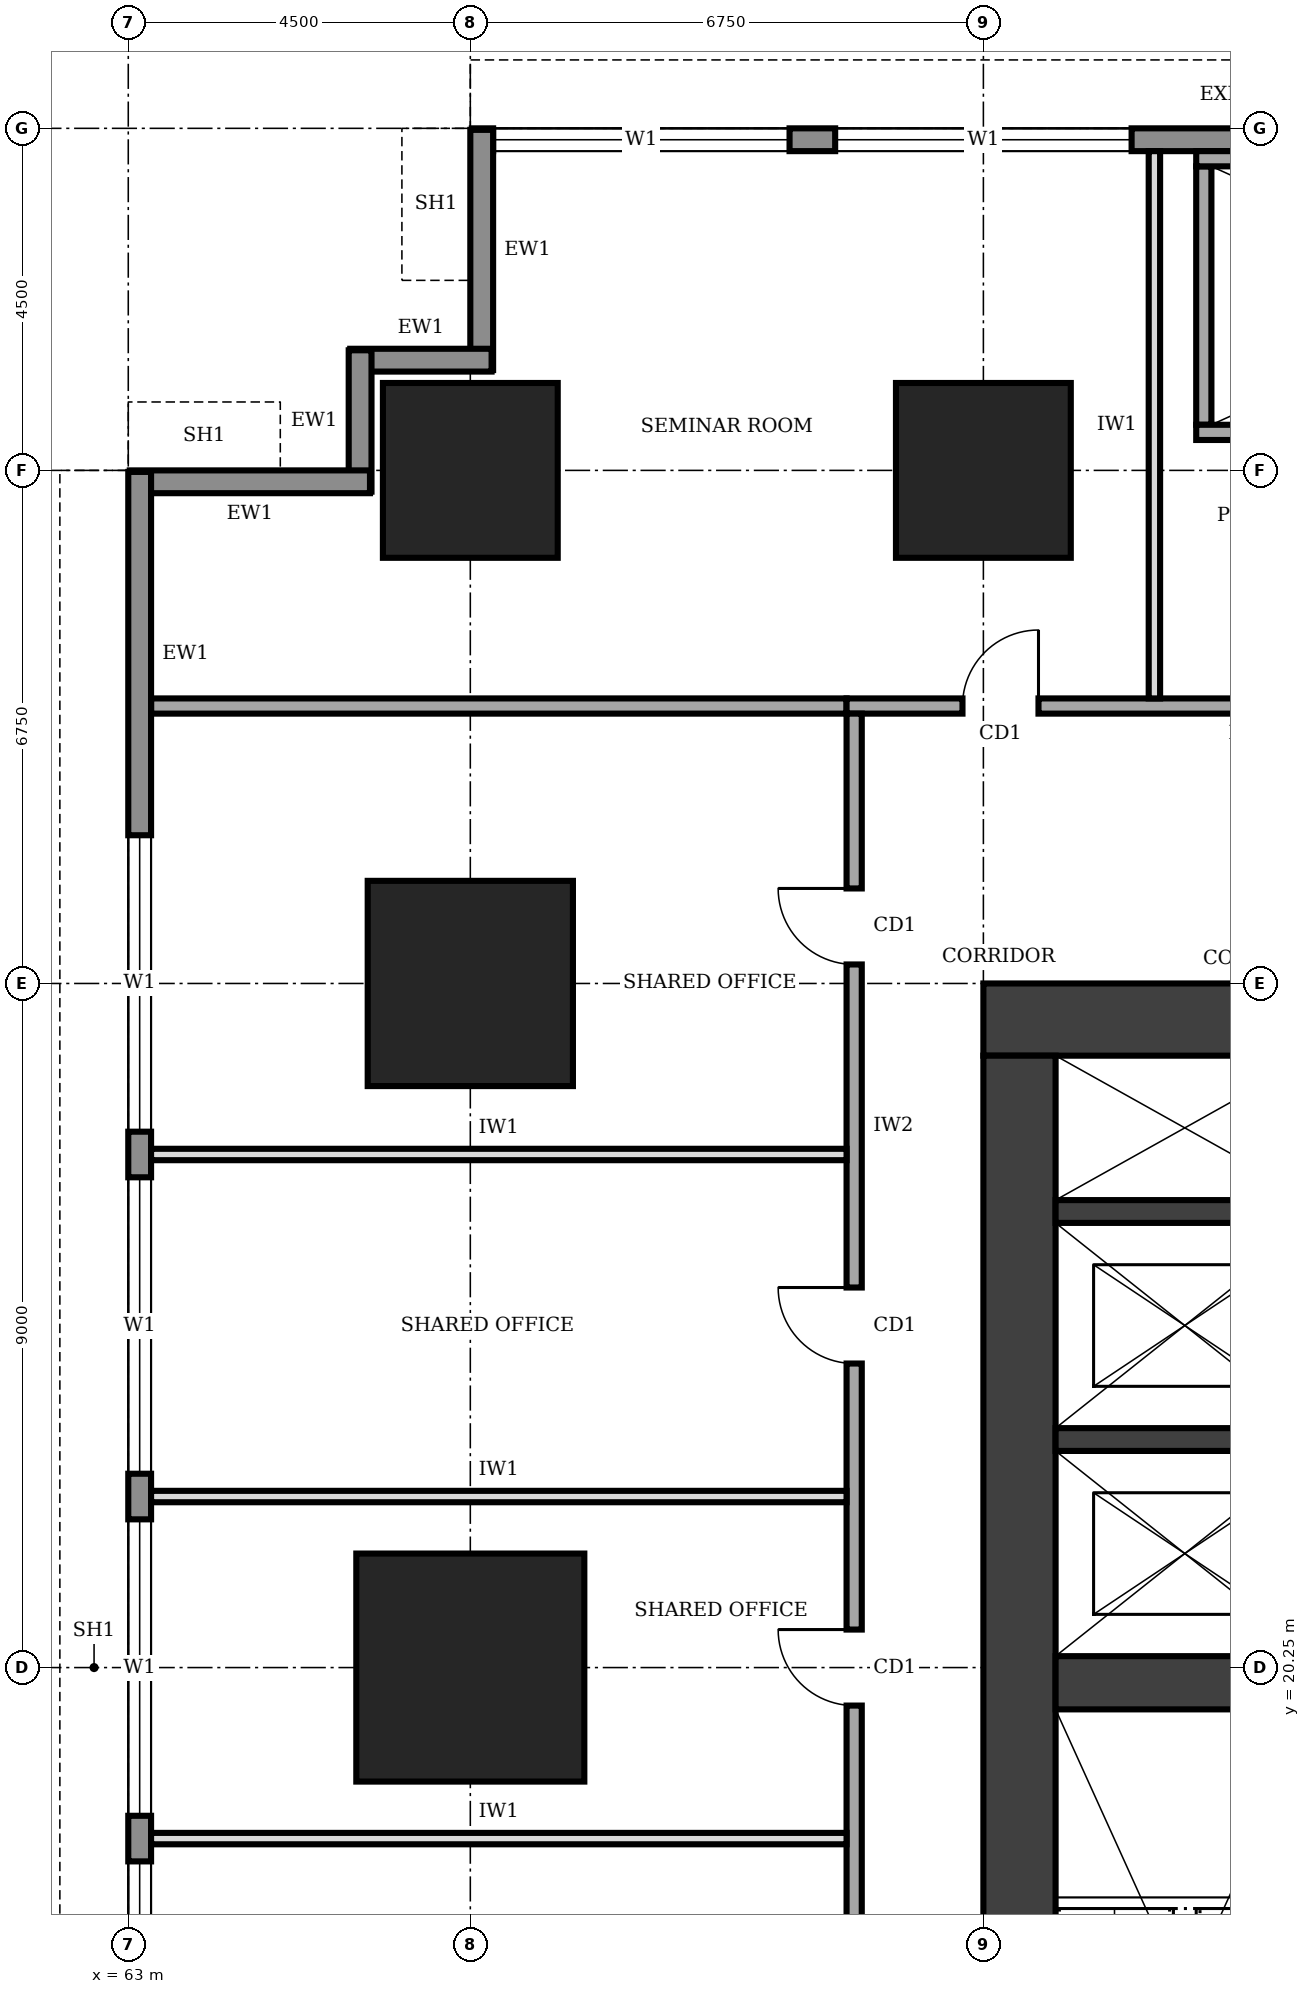
"""IFC4 building model, lengths in metres.
Left out: names, types, materials, properties, quantities, classifications, styles, units other than length and angle.
Written with IfcOpenShell. Run it as: python <this file> out.ifc"""

import sys

from ifc_helpers import new_model, si_unit, direction, frame, frame_2d, origin, origin_2d, place, context, subcontext, project, spatial, rectangle, extrude, element, fill, save


model = new_model("IFC4")
c1 = context("Model", 3, precision=1e-05, world=origin(), true_north=direction((0.0, 1.0)))
c2 = subcontext(c1, "Body", "Model", "MODEL_VIEW")
j1 = project(units=[si_unit("LENGTHUNIT", "METRE"), si_unit("PLANEANGLEUNIT", "RADIAN")], contexts=[c1])
p1 = place(None, origin())
s1 = spatial("IfcSite", under=j1, at=p1, CompositionType="ELEMENT")
p2 = place(p1, origin())
s2 = spatial("IfcBuilding", under=s1, at=p2, CompositionType="ELEMENT")
p3 = place(p2, frame((0.0, 0.0, 29.0)))
s3 = spatial("IfcBuildingStorey", under=s2, at=p3, CompositionType="ELEMENT", Elevation=29.0)
p4 = place(p3, frame((87.75, 28.775, 0.0), z_axis=(0.0, 0.0, 1.0), x_axis=(-1.0, 0.0, 0.0)))
e1 = element("IfcWall", 1, at=p4, inside=s3, PredefinedType="SHEAR", context=c2, shape_type="SweptSolid", body=[
    extrude(rectangle(XDim=13.5, YDim=0.95, at=frame_2d((6.75, 0.0))), origin(), (0.0, 0.0, 1.0), 4.0),
])
p5 = place(p4, frame((4.75, 0.0, 0.0)))
e2 = element("IfcOpeningElement", 2, at=p5, cuts=e1, PredefinedType="OPENING", context=c2, shape_type="SweptSolid", body=[
    extrude(rectangle(XDim=1.8, YDim=2.1, at=frame_2d((0.9, 1.05))), frame((0.0, 0.485, 0.0), z_axis=(0.0, -1.0, 0.0), x_axis=(1.0, 0.0, 0.0)), (0.0, 0.0, 1.0), 0.97),
])
p6 = place(p3, frame((74.725, 28.3, 0.0), z_axis=(0.0, 0.0, 1.0), x_axis=(0.0, -1.0, 0.0)))
e3 = element("IfcWall", 3, at=p6, inside=s3, PredefinedType="SHEAR", context=c2, shape_type="SweptSolid", body=[
    extrude(rectangle(XDim=16.1, YDim=0.95, at=frame_2d((8.05, 0.0))), origin(), (0.0, 0.0, 1.0), 4.0),
])
p7 = place(p3, frame((75.2, 20.05, 0.0), z_axis=(0.0, 0.0, 1.0), x_axis=(1.0, 0.0, 0.0)))
e4 = element("IfcWall", 4, at=p7, inside=s3, PredefinedType="SHEAR", context=c2, shape_type="SweptSolid", body=[
    extrude(rectangle(XDim=3.4, YDim=0.7, at=frame_2d((1.7, 0.0))), origin(), (0.0, 0.0, 1.0), 4.0),
])
for number, where, z_axis, x_axis in (
    (5, (75.2, 23.25, 0.0), (0.0, 0.0, 1.0), (1.0, 0.0, 0.0)),
    (6, (75.2, 26.25, 0.0), (0.0, 0.0, 1.0), (1.0, 0.0, 0.0)),
):
    element("IfcWall", number, at=place(p3, frame(where, z_axis=z_axis, x_axis=x_axis)), inside=s3, PredefinedType="SHEAR", context=c2, shape_type="SweptSolid", body=[
        extrude(rectangle(XDim=3.4, YDim=0.3, at=frame_2d((1.7, 0.0))), origin(), (0.0, 0.0, 1.0), 4.0),
    ])
p8 = place(p3, frame((67.5, 20.25, 0.0), z_axis=(0.0, 0.0, 1.0), x_axis=(1.0, 0.0, 0.0)))
e7 = element("IfcColumn", 7, at=p8, inside=s3, PredefinedType="COLUMN", context=c2, shape_type="SweptSolid", body=[
    extrude(rectangle(XDim=3.0, YDim=3.0, at=origin_2d()), origin(), (0.0, 0.0, 1.0), 4.0),
])
p9 = place(p3, frame((67.5, 29.25, 0.0), z_axis=(0.0, 0.0, 1.0), x_axis=(1.0, 0.0, 0.0)))
e8 = element("IfcColumn", 8, at=p9, inside=s3, PredefinedType="COLUMN", context=c2, shape_type="SweptSolid", body=[
    extrude(rectangle(XDim=2.7, YDim=2.7, at=origin_2d()), origin(), (0.0, 0.0, 1.0), 4.0),
])
for number, where, z_axis, x_axis in (
    (9, (67.5, 36.0, 0.0), (0.0, 0.0, 1.0), (1.0, 0.0, 0.0)),
    (10, (74.25, 36.0, 0.0), (0.0, 0.0, 1.0), (1.0, 0.0, 0.0)),
):
    element("IfcColumn", number, at=place(p3, frame(where, z_axis=z_axis, x_axis=x_axis)), inside=s3, PredefinedType="COLUMN", context=c2, shape_type="SweptSolid", body=[
        extrude(rectangle(XDim=2.3, YDim=2.3, at=origin_2d()), origin(), (0.0, 0.0, 1.0), 4.0),
    ])
p10 = place(p3, frame((94.48, 40.35, 0.0), z_axis=(0.0, 0.0, 1.0), x_axis=(-1.0, 0.0, 0.0)))
e11 = element("IfcWall", 11, at=p10, inside=s3, PredefinedType="STANDARD", context=c2, shape_type="SweptSolid", body=[
    extrude(rectangle(XDim=26.96, YDim=0.3, at=frame_2d((13.48, 0.0))), origin(), (0.0, 0.0, 1.0), 3.75),
])
p11 = place(p10, frame((22.78, 0.0, 0.9)))
e12 = element("IfcOpeningElement", 12, at=p11, cuts=e11, PredefinedType="OPENING", context=c2, shape_type="SweptSolid", body=[
    extrude(rectangle(XDim=3.9, YDim=2.2, at=frame_2d((1.95, 1.1))), frame((0.0, 0.16, 0.0), z_axis=(0.0, -1.0, 0.0), x_axis=(1.0, 0.0, 0.0)), (0.0, 0.0, 1.0), 0.32),
])
p12 = place(p10, frame((18.28, 0.0, 0.9)))
e13 = element("IfcOpeningElement", 13, at=p12, cuts=e11, PredefinedType="OPENING", context=c2, shape_type="SweptSolid", body=[
    extrude(rectangle(XDim=3.9, YDim=2.2, at=frame_2d((1.95, 1.1))), frame((0.0, 0.16, 0.0), z_axis=(0.0, -1.0, 0.0), x_axis=(1.0, 0.0, 0.0)), (0.0, 0.0, 1.0), 0.32),
])
p13 = place(p10, frame((4.78, 0.0, 0.9)))
e14 = element("IfcOpeningElement", 14, at=p13, cuts=e11, PredefinedType="OPENING", context=c2, shape_type="SweptSolid", body=[
    extrude(rectangle(XDim=3.9, YDim=2.2, at=frame_2d((1.95, 1.1))), frame((0.0, 0.16, 0.0), z_axis=(0.0, -1.0, 0.0), x_axis=(1.0, 0.0, 0.0)), (0.0, 0.0, 1.0), 0.32),
])
p14 = place(p3, frame((67.65, 40.48, 0.0), z_axis=(0.0, 0.0, 1.0), x_axis=(0.0, -1.0, 0.0)))
e15 = element("IfcWall", 15, at=p14, inside=s3, PredefinedType="STANDARD", context=c2, shape_type="SweptSolid", body=[
    extrude(rectangle(XDim=3.16, YDim=0.3, at=frame_2d((1.58, 0.0))), origin(), (0.0, 0.0, 1.0), 2.85),
])
for number, where, z_axis, x_axis in (
    (16, (67.78, 37.45, 0.0), (0.0, 0.0, 1.0), (-1.0, 0.0, 0.0)),
    (17, (66.05, 37.58, 0.0), (0.0, 0.0, 1.0), (0.0, -1.0, 0.0)),
):
    element("IfcWall", number, at=place(p3, frame(where, z_axis=z_axis, x_axis=x_axis)), inside=s3, PredefinedType="STANDARD", context=c2, shape_type="SweptSolid", body=[
        extrude(rectangle(XDim=1.86, YDim=0.3, at=frame_2d((0.93, 0.0))), origin(), (0.0, 0.0, 1.0), 3.75),
    ])
p15 = place(p3, frame((66.18, 35.85, 0.0), z_axis=(0.0, 0.0, 1.0), x_axis=(-1.0, 0.0, 0.0)))
e18 = element("IfcWall", 18, at=p15, inside=s3, PredefinedType="STANDARD", context=c2, shape_type="SweptSolid", body=[
    extrude(rectangle(XDim=3.16, YDim=0.3, at=frame_2d((1.58, 0.0))), origin(), (0.0, 0.0, 1.0), 2.85),
])
p16 = place(p3, frame((63.15, 35.98, 0.0), z_axis=(0.0, 0.0, 1.0), x_axis=(0.0, -1.0, 0.0)))
e19 = element("IfcWall", 19, at=p16, inside=s3, PredefinedType="STANDARD", context=c2, shape_type="SweptSolid", body=[
    extrude(rectangle(XDim=31.46, YDim=0.3, at=frame_2d((15.73, 0.0))), origin(), (0.0, 0.0, 1.0), 3.75),
])
p17 = place(p16, frame((27.28, 0.0, 0.9)))
e20 = element("IfcOpeningElement", 20, at=p17, cuts=e19, PredefinedType="OPENING", context=c2, shape_type="SweptSolid", body=[
    extrude(rectangle(XDim=3.9, YDim=2.2, at=frame_2d((1.95, 1.1))), frame((0.0, 0.16, 0.0), z_axis=(0.0, -1.0, 0.0), x_axis=(1.0, 0.0, 0.0)), (0.0, 0.0, 1.0), 0.32),
])
p18 = place(p16, frame((22.78, 0.0, 0.9)))
e21 = element("IfcOpeningElement", 21, at=p18, cuts=e19, PredefinedType="OPENING", context=c2, shape_type="SweptSolid", body=[
    extrude(rectangle(XDim=3.9, YDim=2.2, at=frame_2d((1.95, 1.1))), frame((0.0, 0.16, 0.0), z_axis=(0.0, -1.0, 0.0), x_axis=(1.0, 0.0, 0.0)), (0.0, 0.0, 1.0), 0.32),
])
p19 = place(p16, frame((18.28, 0.0, 0.9)))
e22 = element("IfcOpeningElement", 22, at=p19, cuts=e19, PredefinedType="OPENING", context=c2, shape_type="SweptSolid", body=[
    extrude(rectangle(XDim=3.9, YDim=2.2, at=frame_2d((1.95, 1.1))), frame((0.0, 0.16, 0.0), z_axis=(0.0, -1.0, 0.0), x_axis=(1.0, 0.0, 0.0)), (0.0, 0.0, 1.0), 0.32),
])
p20 = place(p16, frame((13.78, 0.0, 0.9)))
e23 = element("IfcOpeningElement", 23, at=p20, cuts=e19, PredefinedType="OPENING", context=c2, shape_type="SweptSolid", body=[
    extrude(rectangle(XDim=3.9, YDim=2.2, at=frame_2d((1.95, 1.1))), frame((0.0, 0.16, 0.0), z_axis=(0.0, -1.0, 0.0), x_axis=(1.0, 0.0, 0.0)), (0.0, 0.0, 1.0), 0.32),
])
p21 = place(p16, frame((9.28, 0.0, 0.9)))
e24 = element("IfcOpeningElement", 24, at=p21, cuts=e19, PredefinedType="OPENING", context=c2, shape_type="SweptSolid", body=[
    extrude(rectangle(XDim=3.9, YDim=2.2, at=frame_2d((1.95, 1.1))), frame((0.0, 0.16, 0.0), z_axis=(0.0, -1.0, 0.0), x_axis=(1.0, 0.0, 0.0)), (0.0, 0.0, 1.0), 0.32),
])
p22 = place(p16, frame((4.78, 0.0, 0.9)))
e25 = element("IfcOpeningElement", 25, at=p22, cuts=e19, PredefinedType="OPENING", context=c2, shape_type="SweptSolid", body=[
    extrude(rectangle(XDim=3.9, YDim=2.2, at=frame_2d((1.95, 1.1))), frame((0.0, 0.16, 0.0), z_axis=(0.0, -1.0, 0.0), x_axis=(1.0, 0.0, 0.0)), (0.0, 0.0, 1.0), 0.32),
])
p23 = place(p3, frame((89.35, 32.9, 0.0), z_axis=(0.0, 0.0, 1.0), x_axis=(-1.0, 0.0, 0.0)))
e26 = element("IfcWall", 26, at=p23, inside=s3, PredefinedType="SOLIDWALL", context=c2, shape_type="SweptSolid", body=[
    extrude(rectangle(XDim=16.9, YDim=0.2, at=frame_2d((8.45, 0.0))), origin(), (0.0, 0.0, 1.0), 3.75),
])
p24 = place(p23, frame((14.375, 0.0, 0.0)))
e27 = element("IfcOpeningElement", 27, at=p24, cuts=e26, PredefinedType="OPENING", context=c2, shape_type="SweptSolid", body=[
    extrude(rectangle(XDim=1.0, YDim=2.1, at=frame_2d((0.5, 1.05))), frame((0.0, 0.11, 0.0), z_axis=(0.0, -1.0, 0.0), x_axis=(1.0, 0.0, 0.0)), (0.0, 0.0, 1.0), 0.22),
])
p25 = place(p23, frame((7.85, 0.0, 0.0)))
e28 = element("IfcOpeningElement", 28, at=p25, cuts=e26, PredefinedType="OPENING", context=c2, shape_type="SweptSolid", body=[
    extrude(rectangle(XDim=1.0, YDim=2.1, at=frame_2d((0.5, 1.05))), frame((0.0, 0.11, 0.0), z_axis=(0.0, -1.0, 0.0), x_axis=(1.0, 0.0, 0.0)), (0.0, 0.0, 1.0), 0.22),
])
p26 = place(p23, frame((1.325, 0.0, 0.0)))
e29 = element("IfcOpeningElement", 29, at=p26, cuts=e26, PredefinedType="OPENING", context=c2, shape_type="SweptSolid", body=[
    extrude(rectangle(XDim=1.0, YDim=2.1, at=frame_2d((0.5, 1.05))), frame((0.0, 0.11, 0.0), z_axis=(0.0, -1.0, 0.0), x_axis=(1.0, 0.0, 0.0)), (0.0, 0.0, 1.0), 0.22),
])
p27 = place(p3, frame((72.55, 32.8, 0.0), z_axis=(0.0, 0.0, 1.0), x_axis=(0.0, -1.0, 0.0)))
e30 = element("IfcWall", 30, at=p27, inside=s3, PredefinedType="SOLIDWALL", context=c2, shape_type="SweptSolid", body=[
    extrude(rectangle(XDim=23.8, YDim=0.2, at=frame_2d((11.9, 0.0))), origin(), (0.0, 0.0, 1.0), 3.75),
])
p28 = place(p27, frame((21.05, 0.0, 0.0)))
e31 = element("IfcOpeningElement", 31, at=p28, cuts=e30, PredefinedType="OPENING", context=c2, shape_type="SweptSolid", body=[
    extrude(rectangle(XDim=1.0, YDim=2.1, at=frame_2d((0.5, 1.05))), frame((0.0, 0.11, 0.0), z_axis=(0.0, -1.0, 0.0), x_axis=(1.0, 0.0, 0.0)), (0.0, 0.0, 1.0), 0.22),
])
p29 = place(p27, frame((16.55, 0.0, 0.0)))
e32 = element("IfcOpeningElement", 32, at=p29, cuts=e30, PredefinedType="OPENING", context=c2, shape_type="SweptSolid", body=[
    extrude(rectangle(XDim=1.0, YDim=2.1, at=frame_2d((0.5, 1.05))), frame((0.0, 0.11, 0.0), z_axis=(0.0, -1.0, 0.0), x_axis=(1.0, 0.0, 0.0)), (0.0, 0.0, 1.0), 0.22),
])
p30 = place(p27, frame((12.05, 0.0, 0.0)))
e33 = element("IfcOpeningElement", 33, at=p30, cuts=e30, PredefinedType="OPENING", context=c2, shape_type="SweptSolid", body=[
    extrude(rectangle(XDim=1.0, YDim=2.1, at=frame_2d((0.5, 1.05))), frame((0.0, 0.11, 0.0), z_axis=(0.0, -1.0, 0.0), x_axis=(1.0, 0.0, 0.0)), (0.0, 0.0, 1.0), 0.22),
])
p31 = place(p27, frame((7.55, 0.0, 0.0)))
e34 = element("IfcOpeningElement", 34, at=p31, cuts=e30, PredefinedType="OPENING", context=c2, shape_type="SweptSolid", body=[
    extrude(rectangle(XDim=1.0, YDim=2.1, at=frame_2d((0.5, 1.05))), frame((0.0, 0.11, 0.0), z_axis=(0.0, -1.0, 0.0), x_axis=(1.0, 0.0, 0.0)), (0.0, 0.0, 1.0), 0.22),
])
p32 = place(p27, frame((2.3, 0.0, 0.0)))
e35 = element("IfcOpeningElement", 35, at=p32, cuts=e30, PredefinedType="OPENING", context=c2, shape_type="SweptSolid", body=[
    extrude(rectangle(XDim=1.0, YDim=2.1, at=frame_2d((0.5, 1.05))), frame((0.0, 0.11, 0.0), z_axis=(0.0, -1.0, 0.0), x_axis=(1.0, 0.0, 0.0)), (0.0, 0.0, 1.0), 0.22),
])
p33 = place(p3, frame((63.3, 32.9, 0.0), z_axis=(0.0, 0.0, 1.0), x_axis=(1.0, 0.0, 0.0)))
e36 = element("IfcWall", 36, at=p33, inside=s3, PredefinedType="SOLIDWALL", context=c2, shape_type="SweptSolid", body=[
    extrude(rectangle(XDim=9.15, YDim=0.2, at=frame_2d((4.575, 0.0))), origin(), (0.0, 0.0, 1.0), 3.75),
])
p34 = place(p3, frame((76.5, 33.0, 0.0), z_axis=(0.0, 0.0, 1.0), x_axis=(0.0, 1.0, 0.0)))
e37 = element("IfcWall", 37, at=p34, inside=s3, PredefinedType="PARTITIONING", context=c2, shape_type="SweptSolid", body=[
    extrude(rectangle(XDim=7.2, YDim=0.15, at=frame_2d((3.6, 0.0))), origin(), (0.0, 0.0, 1.0), 3.75),
])
for number, where, z_axis, x_axis in (
    (38, (63.3, 18.0, 0.0), (0.0, 0.0, 1.0), (1.0, 0.0, 0.0)),
    (39, (63.3, 22.5, 0.0), (0.0, 0.0, 1.0), (1.0, 0.0, 0.0)),
    (40, (63.3, 27.0, 0.0), (0.0, 0.0, 1.0), (1.0, 0.0, 0.0)),
):
    element("IfcWall", number, at=place(p3, frame(where, z_axis=z_axis, x_axis=x_axis)), inside=s3, PredefinedType="PARTITIONING", context=c2, shape_type="SweptSolid", body=[
        extrude(rectangle(XDim=9.15, YDim=0.15, at=frame_2d((4.575, 0.0))), origin(), (0.0, 0.0, 1.0), 3.75),
    ])
p35 = place(p3, frame((77.05, 36.5, 0.0), z_axis=(0.0, 0.0, 1.0), x_axis=(1.0, 0.0, 0.0)))
e41 = element("IfcWall", 41, at=p35, inside=s3, PredefinedType="SOLIDWALL", context=c2, shape_type="SweptSolid", body=[
    extrude(rectangle(XDim=7.9, YDim=0.2, at=frame_2d((3.95, 0.0))), origin(), (0.0, 0.0, 1.0), 3.75),
])
p36 = place(p35, frame((6.3, 0.0, 0.0)))
e42 = element("IfcOpeningElement", 42, at=p36, cuts=e41, PredefinedType="OPENING", context=c2, shape_type="SweptSolid", body=[
    extrude(rectangle(XDim=1.0, YDim=2.1, at=frame_2d((0.5, 1.05))), frame((0.0, 0.11, 0.0), z_axis=(0.0, -1.0, 0.0), x_axis=(1.0, 0.0, 0.0)), (0.0, 0.0, 1.0), 0.22),
])
p37 = place(p3, frame((77.05, 40.1, 0.0), z_axis=(0.0, 0.0, 1.0), x_axis=(1.0, 0.0, 0.0)))
e43 = element("IfcWall", 43, at=p37, inside=s3, PredefinedType="SOLIDWALL", context=c2, shape_type="SweptSolid", body=[
    extrude(rectangle(XDim=7.9, YDim=0.2, at=frame_2d((3.95, 0.0))), origin(), (0.0, 0.0, 1.0), 3.75),
])
p38 = place(p3, frame((77.15, 36.6, 0.0), z_axis=(0.0, 0.0, 1.0), x_axis=(0.0, 1.0, 0.0)))
e44 = element("IfcWall", 44, at=p38, inside=s3, PredefinedType="SOLIDWALL", context=c2, shape_type="SweptSolid", body=[
    extrude(rectangle(XDim=3.4, YDim=0.2, at=frame_2d((1.7, 0.0))), origin(), (0.0, 0.0, 1.0), 3.75),
])
p39 = place(p11, origin())
e45 = element("IfcWindow", 45, at=p39, inside=s3, PartitioningType="SINGLE_PANEL", PredefinedType="WINDOW", context=c2, shape_type="SweptSolid", body=[
    extrude(rectangle(XDim=3.9, YDim=2.2, at=frame_2d((1.95, 1.1))), frame((0.0, 0.03, 0.0), z_axis=(0.0, -1.0, 0.0), x_axis=(1.0, 0.0, 0.0)), (0.0, 0.0, 1.0), 0.06),
])
fill(e12, e45)
p40 = place(p12, origin())
e46 = element("IfcWindow", 46, at=p40, inside=s3, PartitioningType="SINGLE_PANEL", PredefinedType="WINDOW", context=c2, shape_type="SweptSolid", body=[
    extrude(rectangle(XDim=3.9, YDim=2.2, at=frame_2d((1.95, 1.1))), frame((0.0, 0.03, 0.0), z_axis=(0.0, -1.0, 0.0), x_axis=(1.0, 0.0, 0.0)), (0.0, 0.0, 1.0), 0.06),
])
fill(e13, e46)
p41 = place(p19, origin())
e47 = element("IfcWindow", 47, at=p41, inside=s3, PartitioningType="SINGLE_PANEL", PredefinedType="WINDOW", context=c2, shape_type="SweptSolid", body=[
    extrude(rectangle(XDim=3.9, YDim=2.2, at=frame_2d((1.95, 1.1))), frame((0.0, 0.03, 0.0), z_axis=(0.0, -1.0, 0.0), x_axis=(1.0, 0.0, 0.0)), (0.0, 0.0, 1.0), 0.06),
])
fill(e22, e47)
p42 = place(p20, origin())
e48 = element("IfcWindow", 48, at=p42, inside=s3, PartitioningType="SINGLE_PANEL", PredefinedType="WINDOW", context=c2, shape_type="SweptSolid", body=[
    extrude(rectangle(XDim=3.9, YDim=2.2, at=frame_2d((1.95, 1.1))), frame((0.0, 0.03, 0.0), z_axis=(0.0, -1.0, 0.0), x_axis=(1.0, 0.0, 0.0)), (0.0, 0.0, 1.0), 0.06),
])
fill(e23, e48)
p43 = place(p21, origin())
e49 = element("IfcWindow", 49, at=p43, inside=s3, PartitioningType="SINGLE_PANEL", PredefinedType="WINDOW", context=c2, shape_type="SweptSolid", body=[
    extrude(rectangle(XDim=3.9, YDim=2.2, at=frame_2d((1.95, 1.1))), frame((0.0, 0.03, 0.0), z_axis=(0.0, -1.0, 0.0), x_axis=(1.0, 0.0, 0.0)), (0.0, 0.0, 1.0), 0.06),
])
fill(e24, e49)
p44 = place(p22, origin())
e50 = element("IfcWindow", 50, at=p44, inside=s3, PartitioningType="SINGLE_PANEL", PredefinedType="WINDOW", context=c2, shape_type="SweptSolid", body=[
    extrude(rectangle(XDim=3.9, YDim=2.2, at=frame_2d((1.95, 1.1))), frame((0.0, 0.03, 0.0), z_axis=(0.0, -1.0, 0.0), x_axis=(1.0, 0.0, 0.0)), (0.0, 0.0, 1.0), 0.06),
])
fill(e25, e50)
p45 = place(p24, frame((1.0, 0.0, 0.0), z_axis=(0.0, 0.0, 1.0), x_axis=(-1.0, 0.0, 0.0)))
e51 = element("IfcDoor", 51, at=p45, inside=s3, OperationType="SINGLE_SWING_RIGHT", PredefinedType="DOOR", context=c2, shape_type="SweptSolid", body=[
    extrude(rectangle(XDim=1.0, YDim=2.1, at=frame_2d((0.5, 1.05))), frame((0.0, 0.025, 0.0), z_axis=(0.0, -1.0, 0.0), x_axis=(1.0, 0.0, 0.0)), (0.0, 0.0, 1.0), 0.05),
])
fill(e27, e51)
p46 = place(p30, frame((1.0, 0.0, 0.0), z_axis=(0.0, 0.0, 1.0), x_axis=(-1.0, 0.0, 0.0)))
e52 = element("IfcDoor", 52, at=p46, inside=s3, OperationType="SINGLE_SWING_RIGHT", PredefinedType="DOOR", context=c2, shape_type="SweptSolid", body=[
    extrude(rectangle(XDim=1.0, YDim=2.1, at=frame_2d((0.5, 1.05))), frame((0.0, 0.025, 0.0), z_axis=(0.0, -1.0, 0.0), x_axis=(1.0, 0.0, 0.0)), (0.0, 0.0, 1.0), 0.05),
])
fill(e33, e52)
p47 = place(p31, frame((1.0, 0.0, 0.0), z_axis=(0.0, 0.0, 1.0), x_axis=(-1.0, 0.0, 0.0)))
e53 = element("IfcDoor", 53, at=p47, inside=s3, OperationType="SINGLE_SWING_RIGHT", PredefinedType="DOOR", context=c2, shape_type="SweptSolid", body=[
    extrude(rectangle(XDim=1.0, YDim=2.1, at=frame_2d((0.5, 1.05))), frame((0.0, 0.025, 0.0), z_axis=(0.0, -1.0, 0.0), x_axis=(1.0, 0.0, 0.0)), (0.0, 0.0, 1.0), 0.05),
])
fill(e34, e53)
p48 = place(p32, frame((1.0, 0.0, 0.0), z_axis=(0.0, 0.0, 1.0), x_axis=(-1.0, 0.0, 0.0)))
e54 = element("IfcDoor", 54, at=p48, inside=s3, OperationType="SINGLE_SWING_RIGHT", PredefinedType="DOOR", context=c2, shape_type="SweptSolid", body=[
    extrude(rectangle(XDim=1.0, YDim=2.1, at=frame_2d((0.5, 1.05))), frame((0.0, 0.025, 0.0), z_axis=(0.0, -1.0, 0.0), x_axis=(1.0, 0.0, 0.0)), (0.0, 0.0, 1.0), 0.05),
])
fill(e35, e54)
save(model, sys.argv[1])
